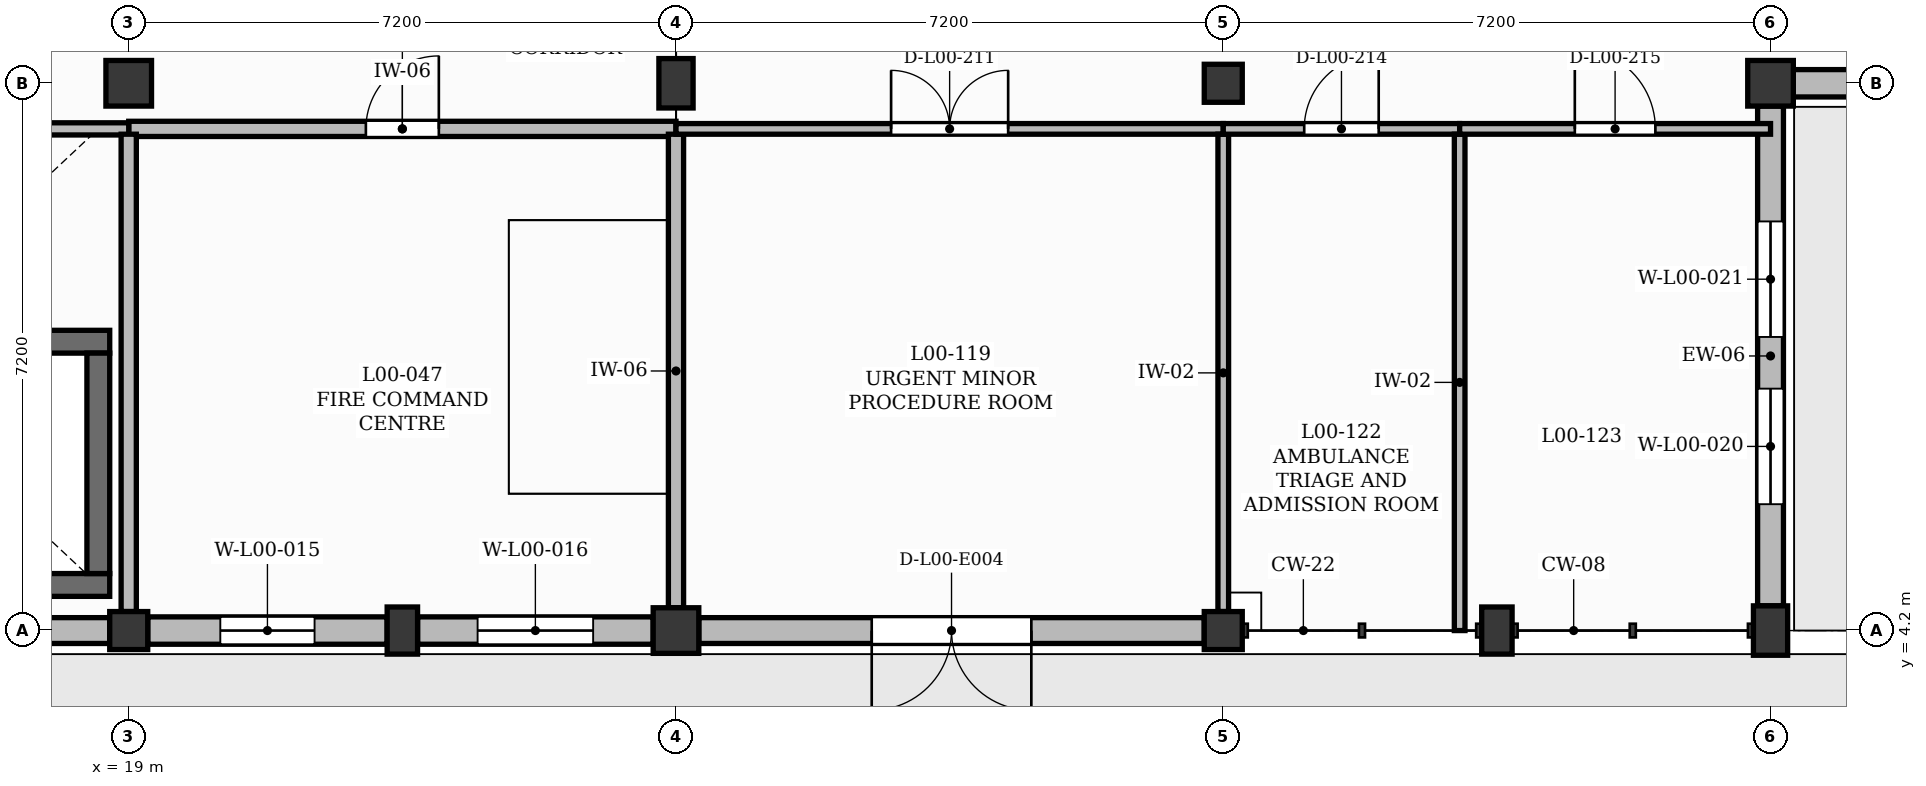
"""IFC4 building model, lengths in metres.
Left out: names, types, materials, properties, quantities, classifications, styles, units other than length and angle.
Written with IfcOpenShell. Run it as: python <this file> out.ifc"""

import sys

from ifc_helpers import new_model, si_unit, direction, frame, frame_2d, origin, origin_2d, place, context, subcontext, project, spatial, rectangle, extrude, element, fill, save


model = new_model("IFC4")
c1 = context("Model", 3, precision=1e-05, world=origin(), true_north=direction((0.0, 1.0)))
c2 = subcontext(c1, "Body", "Model", "MODEL_VIEW")
j1 = project(units=[si_unit("LENGTHUNIT", "METRE"), si_unit("PLANEANGLEUNIT", "RADIAN")], contexts=[c1])
p1 = place(None, origin())
s1 = spatial("IfcSite", under=j1, at=p1, CompositionType="ELEMENT")
p2 = place(p1, origin())
s2 = spatial("IfcBuilding", under=s1, at=p2, CompositionType="ELEMENT")
p3 = place(p2, origin())
s3 = spatial("IfcBuildingStorey", under=s2, at=p3, CompositionType="ELEMENT", Elevation=0.0)
p4 = place(p3, frame((19.0, 4.2, 0.0), z_axis=(0.0, 0.0, 1.0), x_axis=(1.0, 0.0, 0.0)))
e1 = element("IfcColumn", 1, at=p4, inside=s3, PredefinedType="COLUMN", context=c2, shape_type="SweptSolid", body=[
    extrude(rectangle(XDim=0.5, YDim=0.5, at=origin_2d()), origin(), (0.0, 0.0, 1.0), 4.2),
])
for number, where, z_axis, x_axis in (
    (2, (19.0, 11.4, 0.0), (0.0, 0.0, 1.0), (1.0, 0.0, 0.0)),
    (3, (26.2, 4.2, 0.0), (0.0, 0.0, 1.0), (1.0, 0.0, 0.0)),
):
    element("IfcColumn", number, at=place(p3, frame(where, z_axis=z_axis, x_axis=x_axis)), inside=s3, PredefinedType="COLUMN", context=c2, shape_type="SweptSolid", body=[
        extrude(rectangle(XDim=0.6, YDim=0.6, at=origin_2d()), origin(), (0.0, 0.0, 1.0), 4.2),
    ])
p5 = place(p3, frame((26.2, 11.4, 0.0), z_axis=(0.0, 0.0, 1.0), x_axis=(1.0, 0.0, 0.0)))
e4 = element("IfcColumn", 4, at=p5, inside=s3, PredefinedType="COLUMN", context=c2, shape_type="SweptSolid", body=[
    extrude(rectangle(XDim=0.45, YDim=0.65, at=origin_2d()), origin(), (0.0, 0.0, 1.0), 4.2),
])
for number, where, z_axis, x_axis in (
    (5, (33.4, 4.2, 0.0), (0.0, 0.0, 1.0), (1.0, 0.0, 0.0)),
    (6, (33.4, 11.4, 0.0), (0.0, 0.0, 1.0), (1.0, 0.0, 0.0)),
):
    element("IfcColumn", number, at=place(p3, frame(where, z_axis=z_axis, x_axis=x_axis)), inside=s3, PredefinedType="COLUMN", context=c2, shape_type="SweptSolid", body=[
        extrude(rectangle(XDim=0.5, YDim=0.5, at=origin_2d()), origin(), (0.0, 0.0, 1.0), 4.2),
    ])
p6 = place(p3, frame((40.6, 4.2, 0.0), z_axis=(0.0, 0.0, 1.0), x_axis=(1.0, 0.0, 0.0)))
e7 = element("IfcColumn", 7, at=p6, inside=s3, PredefinedType="COLUMN", context=c2, shape_type="SweptSolid", body=[
    extrude(rectangle(XDim=0.45, YDim=0.65, at=origin_2d()), origin(), (0.0, 0.0, 1.0), 4.2),
])
p7 = place(p3, frame((40.6, 11.4, 0.0), z_axis=(0.0, 0.0, 1.0), x_axis=(1.0, 0.0, 0.0)))
e8 = element("IfcColumn", 8, at=p7, inside=s3, PredefinedType="COLUMN", context=c2, shape_type="SweptSolid", body=[
    extrude(rectangle(XDim=0.6, YDim=0.6, at=origin_2d()), origin(), (0.0, 0.0, 1.0), 4.2),
])
for number, where, z_axis, x_axis in (
    (9, (22.6, 4.2, 0.0), (0.0, 0.0, 1.0), (1.0, 0.0, 0.0)),
    (10, (37.0, 4.2, 0.0), (0.0, 0.0, 1.0), (1.0, 0.0, 0.0)),
):
    element("IfcColumn", number, at=place(p3, frame(where, z_axis=z_axis, x_axis=x_axis)), inside=s3, PredefinedType="PILASTER", context=c2, shape_type="SweptSolid", body=[
        extrude(rectangle(XDim=0.4, YDim=0.62, at=origin_2d()), origin(), (0.0, 0.0, 1.0), 4.2),
    ])
p8 = place(p3, frame((12.025, 4.2, 0.0), z_axis=(0.0, 0.0, 1.0), x_axis=(1.0, 0.0, 0.0)))
e11 = element("IfcWall", 11, at=p8, inside=s3, PredefinedType="SOLIDWALL", context=c2, shape_type="SweptSolid", body=[
    extrude(rectangle(XDim=6.725, YDim=0.34, at=frame_2d((3.363, 0.0))), origin(), (0.0, 0.0, 1.0), 3.68),
])
p9 = place(p3, frame((19.25, 4.2, 0.0), z_axis=(0.0, 0.0, 1.0), x_axis=(1.0, 0.0, 0.0)))
e12 = element("IfcWall", 12, at=p9, inside=s3, PredefinedType="SOLIDWALL", context=c2, shape_type="SweptSolid", body=[
    extrude(rectangle(XDim=3.15, YDim=0.36, at=frame_2d((1.575, 0.0))), origin(), (0.0, 0.0, 1.0), 3.68),
])
p10 = place(p9, frame((0.955, 0.0, 1.0)))
e13 = element("IfcOpeningElement", 13, at=p10, cuts=e12, PredefinedType="OPENING", context=c2, shape_type="SweptSolid", body=[
    extrude(rectangle(XDim=1.24, YDim=1.8, at=frame_2d((0.62, 0.9))), frame((0.0, 0.19, 0.0), z_axis=(0.0, -1.0, 0.0), x_axis=(1.0, 0.0, 0.0)), (0.0, 0.0, 1.0), 0.38),
])
p11 = place(p3, frame((22.8, 4.2, 0.0), z_axis=(0.0, 0.0, 1.0), x_axis=(1.0, 0.0, 0.0)))
e14 = element("IfcWall", 14, at=p11, inside=s3, PredefinedType="SOLIDWALL", context=c2, shape_type="SweptSolid", body=[
    extrude(rectangle(XDim=3.1, YDim=0.36, at=frame_2d((1.55, 0.0))), origin(), (0.0, 0.0, 1.0), 3.68),
])
p12 = place(p11, frame((0.79, 0.0, 1.0)))
e15 = element("IfcOpeningElement", 15, at=p12, cuts=e14, PredefinedType="OPENING", context=c2, shape_type="SweptSolid", body=[
    extrude(rectangle(XDim=1.52, YDim=1.8, at=frame_2d((0.76, 0.9))), frame((0.0, 0.19, 0.0), z_axis=(0.0, -1.0, 0.0), x_axis=(1.0, 0.0, 0.0)), (0.0, 0.0, 1.0), 0.38),
])
p13 = place(p3, frame((26.5, 4.2, 0.0), z_axis=(0.0, 0.0, 1.0), x_axis=(1.0, 0.0, 0.0)))
e16 = element("IfcWall", 16, at=p13, inside=s3, PredefinedType="SOLIDWALL", context=c2, shape_type="SweptSolid", body=[
    extrude(rectangle(XDim=6.65, YDim=0.34, at=frame_2d((3.325, 0.0))), origin(), (0.0, 0.0, 1.0), 3.68),
])
p14 = place(p13, frame((2.275, 0.0, 0.0)))
e17 = element("IfcOpeningElement", 17, at=p14, cuts=e16, PredefinedType="OPENING", context=c2, shape_type="SweptSolid", body=[
    extrude(rectangle(XDim=2.1, YDim=2.6, at=frame_2d((1.05, 1.3))), frame((0.0, 0.18, 0.0), z_axis=(0.0, -1.0, 0.0), x_axis=(1.0, 0.0, 0.0)), (0.0, 0.0, 1.0), 0.36),
])
p15 = place(p3, frame((40.6, 4.525, 0.0), z_axis=(0.0, 0.0, 1.0), x_axis=(0.0, 1.0, 0.0)))
e18 = element("IfcWall", 18, at=p15, inside=s3, PredefinedType="SOLIDWALL", context=c2, shape_type="SweptSolid", body=[
    extrude(rectangle(XDim=6.575, YDim=0.34, at=frame_2d((3.288, 0.0))), origin(), (0.0, 0.0, 1.0), 3.68),
])
p16 = place(p15, frame((1.337, 0.0, 1.0)))
e19 = element("IfcOpeningElement", 19, at=p16, cuts=e18, PredefinedType="OPENING", context=c2, shape_type="SweptSolid", body=[
    extrude(rectangle(XDim=1.52, YDim=1.8, at=frame_2d((0.76, 0.9))), frame((0.0, 0.18, 0.0), z_axis=(0.0, -1.0, 0.0), x_axis=(1.0, 0.0, 0.0)), (0.0, 0.0, 1.0), 0.36),
])
p17 = place(p15, frame((3.538, 0.0, 1.0)))
e20 = element("IfcOpeningElement", 20, at=p17, cuts=e18, PredefinedType="OPENING", context=c2, shape_type="SweptSolid", body=[
    extrude(rectangle(XDim=1.52, YDim=1.8, at=frame_2d((0.76, 0.9))), frame((0.0, 0.18, 0.0), z_axis=(0.0, -1.0, 0.0), x_axis=(1.0, 0.0, 0.0)), (0.0, 0.0, 1.0), 0.36),
])
p18 = place(p3, frame((40.9, 11.4, 0.0), z_axis=(0.0, 0.0, 1.0), x_axis=(1.0, 0.0, 0.0)))
e21 = element("IfcWall", 21, at=p18, inside=s3, PredefinedType="SOLIDWALL", context=c2, shape_type="SweptSolid", body=[
    extrude(rectangle(XDim=6.65, YDim=0.36, at=frame_2d((3.325, 0.0))), origin(), (0.0, 0.0, 1.0), 3.68),
])
p19 = place(p18, frame((2.735, 0.0, 0.0)))
e22 = element("IfcOpeningElement", 22, at=p19, cuts=e21, PredefinedType="OPENING", context=c2, shape_type="SweptSolid", body=[
    extrude(rectangle(XDim=1.18, YDim=2.2, at=frame_2d((0.59, 1.1))), frame((0.0, 0.19, 0.0), z_axis=(0.0, -1.0, 0.0), x_axis=(1.0, 0.0, 0.0)), (0.0, 0.0, 1.0), 0.38),
])
p20 = place(p18, frame((0.788, 0.0, 1.0)))
e23 = element("IfcOpeningElement", 23, at=p20, cuts=e21, PredefinedType="OPENING", context=c2, shape_type="SweptSolid", body=[
    extrude(rectangle(XDim=1.22, YDim=2.2, at=frame_2d((0.61, 1.1))), frame((0.0, 0.19, 0.0), z_axis=(0.0, -1.0, 0.0), x_axis=(1.0, 0.0, 0.0)), (0.0, 0.0, 1.0), 0.38),
])
p21 = place(p18, frame((4.577, 0.0, 1.0)))
e24 = element("IfcOpeningElement", 24, at=p21, cuts=e21, PredefinedType="OPENING", context=c2, shape_type="SweptSolid", body=[
    extrude(rectangle(XDim=1.35, YDim=2.2, at=frame_2d((0.675, 1.1))), frame((0.0, 0.19, 0.0), z_axis=(0.0, -1.0, 0.0), x_axis=(1.0, 0.0, 0.0)), (0.0, 0.0, 1.0), 0.38),
])
for number, where, z_axis, x_axis in (
    (25, (12.05, 4.8, 0.0), (0.0, 0.0, 1.0), (1.0, 0.0, 0.0)),
    (26, (12.05, 8.0, 0.0), (0.0, 0.0, 1.0), (1.0, 0.0, 0.0)),
):
    element("IfcWall", number, at=place(p3, frame(where, z_axis=z_axis, x_axis=x_axis)), inside=s3, PredefinedType="SHEAR", context=c2, shape_type="SweptSolid", body=[
        extrude(rectangle(XDim=6.7, YDim=0.3, at=frame_2d((3.35, 0.0))), origin(), (0.0, 0.0, 1.0), 4.25),
    ])
p22 = place(p3, frame((18.6, 4.95, 0.0), z_axis=(0.0, 0.0, 1.0), x_axis=(0.0, 1.0, 0.0)))
e27 = element("IfcWall", 27, at=p22, inside=s3, PredefinedType="SHEAR", context=c2, shape_type="SweptSolid", body=[
    extrude(rectangle(XDim=2.9, YDim=0.3, at=frame_2d((1.45, 0.0))), origin(), (0.0, 0.0, 1.0), 4.25),
])
p23 = place(p3, frame((19.0, 10.8, 0.0), z_axis=(0.0, 0.0, 1.0), x_axis=(1.0, 0.0, 0.0)))
e28 = element("IfcWall", 28, at=p23, inside=s3, PredefinedType="PARTITIONING", context=c2, shape_type="SweptSolid", body=[
    extrude(rectangle(XDim=7.2, YDim=0.2, at=frame_2d((3.6, 0.0))), origin(), (0.0, 0.0, 1.0), 4.18),
])
p24 = place(p23, frame((3.12, 0.0, 0.0)))
e29 = element("IfcOpeningElement", 29, at=p24, cuts=e28, PredefinedType="OPENING", context=c2, shape_type="SweptSolid", body=[
    extrude(rectangle(XDim=0.96, YDim=2.1, at=frame_2d((0.48, 1.05))), frame((0.0, 0.11, 0.0), z_axis=(0.0, -1.0, 0.0), x_axis=(1.0, 0.0, 0.0)), (0.0, 0.0, 1.0), 0.22),
])
p25 = place(p3, frame((26.2, 4.5, 0.0), z_axis=(0.0, 0.0, 1.0), x_axis=(0.0, 1.0, 0.0)))
e30 = element("IfcWall", 30, at=p25, inside=s3, PredefinedType="PARTITIONING", context=c2, shape_type="SweptSolid", body=[
    extrude(rectangle(XDim=6.23, YDim=0.2, at=frame_2d((3.115, 0.0))), origin(), (0.0, 0.0, 1.0), 3.5),
])
p26 = place(p3, frame((26.2, 10.8, 0.0), z_axis=(0.0, 0.0, 1.0), x_axis=(1.0, 0.0, 0.0)))
e31 = element("IfcWall", 31, at=p26, inside=s3, PredefinedType="PARTITIONING", context=c2, shape_type="SweptSolid", body=[
    extrude(rectangle(XDim=7.2, YDim=0.14, at=frame_2d((3.6, 0.0))), origin(), (0.0, 0.0, 1.0), 4.18),
])
p27 = place(p26, frame((2.83, 0.0, 0.0)))
e32 = element("IfcOpeningElement", 32, at=p27, cuts=e31, PredefinedType="OPENING", context=c2, shape_type="SweptSolid", body=[
    extrude(rectangle(XDim=1.54, YDim=2.25, at=frame_2d((0.77, 1.125))), frame((0.0, 0.08, 0.0), z_axis=(0.0, -1.0, 0.0), x_axis=(1.0, 0.0, 0.0)), (0.0, 0.0, 1.0), 0.16),
])
p28 = place(p3, frame((33.4, 4.45, 0.0), z_axis=(0.0, 0.0, 1.0), x_axis=(0.0, 1.0, 0.0)))
e33 = element("IfcWall", 33, at=p28, inside=s3, PredefinedType="PARTITIONING", context=c2, shape_type="SweptSolid", body=[
    extrude(rectangle(XDim=6.28, YDim=0.14, at=frame_2d((3.14, 0.0))), origin(), (0.0, 0.0, 1.0), 3.5),
])
p29 = place(p3, frame((33.4, 10.8, 0.0), z_axis=(0.0, 0.0, 1.0), x_axis=(1.0, 0.0, 0.0)))
e34 = element("IfcWall", 34, at=p29, inside=s3, PredefinedType="PARTITIONING", context=c2, shape_type="SweptSolid", body=[
    extrude(rectangle(XDim=3.11, YDim=0.14, at=frame_2d((1.555, 0.0))), origin(), (0.0, 0.0, 1.0), 4.18),
])
p30 = place(p29, frame((1.065, 0.0, 0.0)))
e35 = element("IfcOpeningElement", 35, at=p30, cuts=e34, PredefinedType="OPENING", context=c2, shape_type="SweptSolid", body=[
    extrude(rectangle(XDim=0.98, YDim=2.15, at=frame_2d((0.49, 1.075))), frame((0.0, 0.08, 0.0), z_axis=(0.0, -1.0, 0.0), x_axis=(1.0, 0.0, 0.0)), (0.0, 0.0, 1.0), 0.16),
])
p31 = place(p3, frame((36.51, 4.2, 0.0), z_axis=(0.0, 0.0, 1.0), x_axis=(0.0, 1.0, 0.0)))
e36 = element("IfcWall", 36, at=p31, inside=s3, PredefinedType="PARTITIONING", context=c2, shape_type="SweptSolid", body=[
    extrude(rectangle(XDim=6.53, YDim=0.14, at=frame_2d((3.265, 0.0))), origin(), (0.0, 0.0, 1.0), 4.18),
])
p32 = place(p3, frame((36.51, 10.8, 0.0), z_axis=(0.0, 0.0, 1.0), x_axis=(1.0, 0.0, 0.0)))
e37 = element("IfcWall", 37, at=p32, inside=s3, PredefinedType="PARTITIONING", context=c2, shape_type="SweptSolid", body=[
    extrude(rectangle(XDim=4.09, YDim=0.14, at=frame_2d((2.045, 0.0))), origin(), (0.0, 0.0, 1.0), 4.18),
])
p33 = place(p32, frame((1.515, 0.0, 0.0)))
e38 = element("IfcOpeningElement", 38, at=p33, cuts=e37, PredefinedType="OPENING", context=c2, shape_type="SweptSolid", body=[
    extrude(rectangle(XDim=1.06, YDim=2.15, at=frame_2d((0.53, 1.075))), frame((0.0, 0.08, 0.0), z_axis=(0.0, -1.0, 0.0), x_axis=(1.0, 0.0, 0.0)), (0.0, 0.0, 1.0), 0.16),
])
p34 = place(p3, frame((16.4, 10.8, 0.0), z_axis=(0.0, 0.0, 1.0), x_axis=(1.0, 0.0, 0.0)))
e39 = element("IfcWall", 39, at=p34, inside=s3, PredefinedType="PARTITIONING", context=c2, shape_type="SweptSolid", body=[
    extrude(rectangle(XDim=2.6, YDim=0.16, at=frame_2d((1.3, 0.0))), origin(), (0.0, 0.0, 1.0), 4.18),
])
p35 = place(p3, frame((19.0, 4.45, 0.0), z_axis=(0.0, 0.0, 1.0), x_axis=(0.0, 1.0, 0.0)))
e40 = element("IfcWall", 40, at=p35, inside=s3, PredefinedType="PARTITIONING", context=c2, shape_type="SweptSolid", body=[
    extrude(rectangle(XDim=6.28, YDim=0.2, at=frame_2d((3.14, 0.0))), origin(), (0.0, 0.0, 1.0), 3.5),
])
p36 = place(p10, origin())
e41 = element("IfcWindow", 41, at=p36, inside=s3, PartitioningType="SINGLE_PANEL", PredefinedType="WINDOW", context=c2, shape_type="SweptSolid", body=[
    extrude(rectangle(XDim=1.24, YDim=1.8, at=frame_2d((0.62, 0.9))), frame((0.0, 0.03, 0.0), z_axis=(0.0, -1.0, 0.0), x_axis=(1.0, 0.0, 0.0)), (0.0, 0.0, 1.0), 0.06),
])
fill(e13, e41)
p37 = place(p12, origin())
e42 = element("IfcWindow", 42, at=p37, inside=s3, PartitioningType="DOUBLE_PANEL_VERTICAL", PredefinedType="WINDOW", context=c2, shape_type="SweptSolid", body=[
    extrude(rectangle(XDim=1.52, YDim=1.8, at=frame_2d((0.76, 0.9))), frame((0.0, 0.03, 0.0), z_axis=(0.0, -1.0, 0.0), x_axis=(1.0, 0.0, 0.0)), (0.0, 0.0, 1.0), 0.06),
])
fill(e15, e42)
p38 = place(p14, frame((2.1, 0.0, 0.0), z_axis=(0.0, 0.0, 1.0), x_axis=(-1.0, 0.0, 0.0)))
e43 = element("IfcDoor", 43, at=p38, inside=s3, OperationType="DOUBLE_DOOR_SINGLE_SWING", PredefinedType="DOOR", context=c2, shape_type="SweptSolid", body=[
    extrude(rectangle(XDim=2.1, YDim=2.6, at=frame_2d((1.05, 1.3))), frame((0.0, 0.025, 0.0), z_axis=(0.0, -1.0, 0.0), x_axis=(1.0, 0.0, 0.0)), (0.0, 0.0, 1.0), 0.05),
])
fill(e17, e43)
p39 = place(p16, origin())
e44 = element("IfcWindow", 44, at=p39, inside=s3, PartitioningType="DOUBLE_PANEL_VERTICAL", PredefinedType="WINDOW", context=c2, shape_type="SweptSolid", body=[
    extrude(rectangle(XDim=1.52, YDim=1.8, at=frame_2d((0.76, 0.9))), frame((0.0, 0.03, 0.0), z_axis=(0.0, -1.0, 0.0), x_axis=(1.0, 0.0, 0.0)), (0.0, 0.0, 1.0), 0.06),
])
fill(e19, e44)
p40 = place(p17, origin())
e45 = element("IfcWindow", 45, at=p40, inside=s3, PartitioningType="DOUBLE_PANEL_VERTICAL", PredefinedType="WINDOW", context=c2, shape_type="SweptSolid", body=[
    extrude(rectangle(XDim=1.52, YDim=1.8, at=frame_2d((0.76, 0.9))), frame((0.0, 0.03, 0.0), z_axis=(0.0, -1.0, 0.0), x_axis=(1.0, 0.0, 0.0)), (0.0, 0.0, 1.0), 0.06),
])
fill(e20, e45)
p41 = place(p24, origin())
e46 = element("IfcDoor", 46, at=p41, inside=s3, OperationType="SINGLE_SWING_RIGHT", PredefinedType="DOOR", context=c2, shape_type="SweptSolid", body=[
    extrude(rectangle(XDim=0.96, YDim=2.1, at=frame_2d((0.48, 1.05))), frame((0.0, 0.025, 0.0), z_axis=(0.0, -1.0, 0.0), x_axis=(1.0, 0.0, 0.0)), (0.0, 0.0, 1.0), 0.05),
])
fill(e29, e46)
p42 = place(p27, origin())
e47 = element("IfcDoor", 47, at=p42, inside=s3, OperationType="DOUBLE_DOOR_SINGLE_SWING", PredefinedType="DOOR", context=c2, shape_type="SweptSolid", body=[
    extrude(rectangle(XDim=1.54, YDim=2.25, at=frame_2d((0.77, 1.125))), frame((0.0, 0.025, 0.0), z_axis=(0.0, -1.0, 0.0), x_axis=(1.0, 0.0, 0.0)), (0.0, 0.0, 1.0), 0.05),
])
fill(e32, e47)
p43 = place(p30, origin())
e48 = element("IfcDoor", 48, at=p43, inside=s3, OperationType="SINGLE_SWING_RIGHT", PredefinedType="DOOR", context=c2, shape_type="SweptSolid", body=[
    extrude(rectangle(XDim=0.98, YDim=2.15, at=frame_2d((0.49, 1.075))), frame((0.0, 0.025, 0.0), z_axis=(0.0, -1.0, 0.0), x_axis=(1.0, 0.0, 0.0)), (0.0, 0.0, 1.0), 0.05),
])
fill(e35, e48)
p44 = place(p33, origin())
e49 = element("IfcDoor", 49, at=p44, inside=s3, OperationType="SINGLE_SWING_LEFT", PredefinedType="DOOR", context=c2, shape_type="SweptSolid", body=[
    extrude(rectangle(XDim=1.06, YDim=2.15, at=frame_2d((0.53, 1.075))), frame((0.0, 0.025, 0.0), z_axis=(0.0, -1.0, 0.0), x_axis=(1.0, 0.0, 0.0)), (0.0, 0.0, 1.0), 0.05),
])
fill(e38, e49)
save(model, sys.argv[1])
